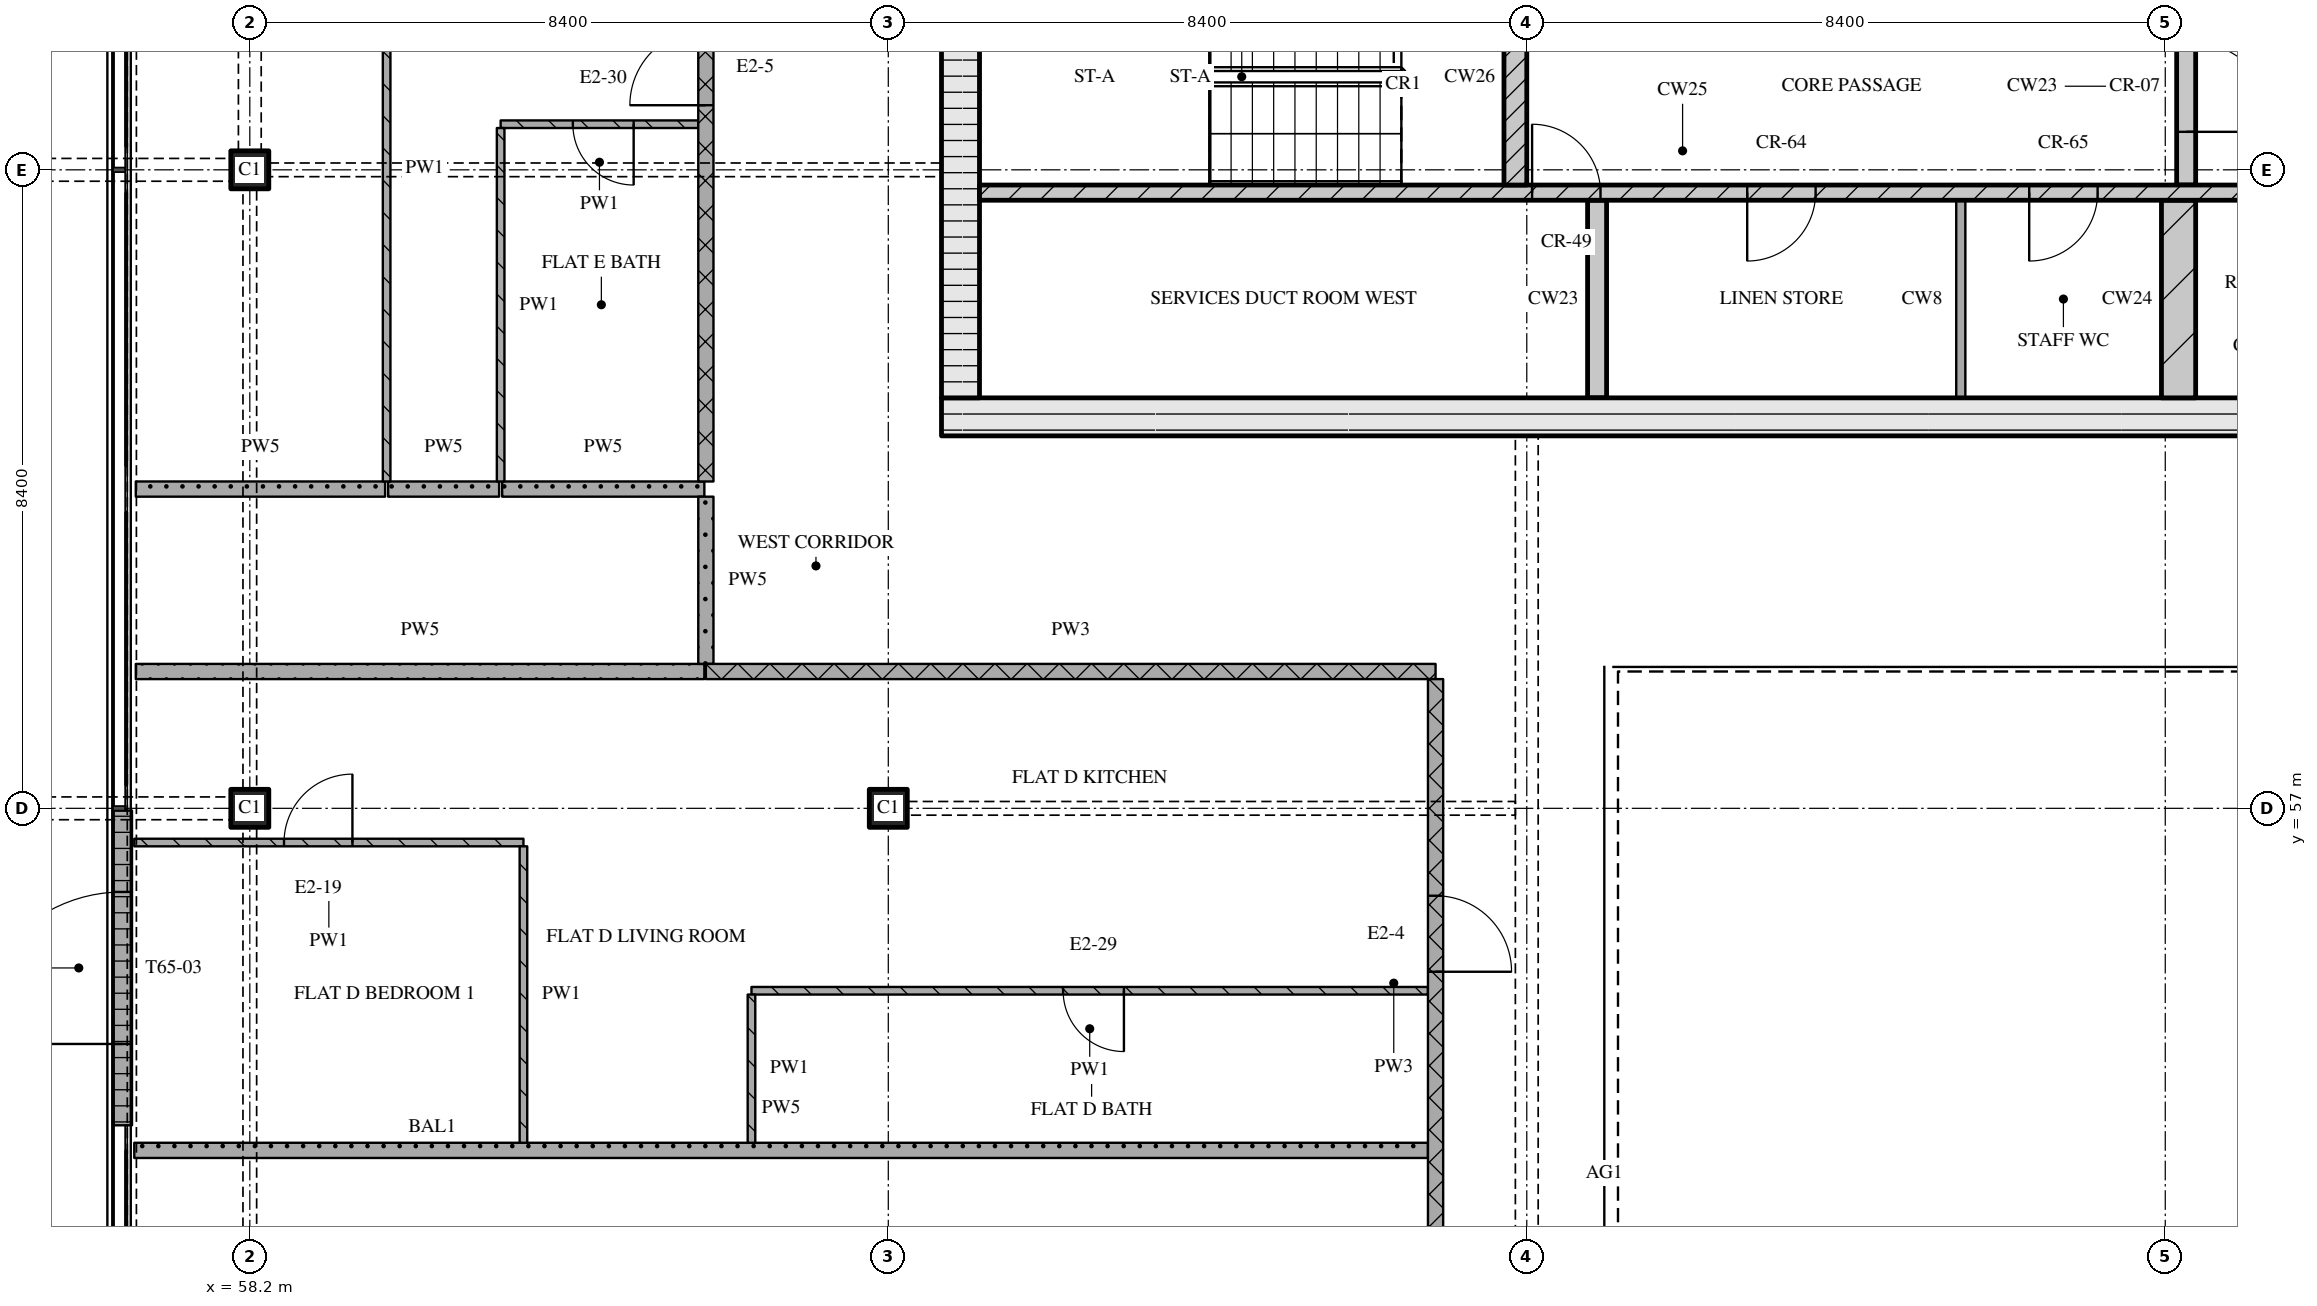
"""IFC4 building model, lengths in metres.
Left out: names, types, materials, properties, quantities, classifications, styles, units other than length and angle.
Written with IfcOpenShell. Run it as: python <this file> out.ifc"""

import sys

from ifc_helpers import new_model, si_unit, direction, frame, frame_2d, origin, origin_2d, place, context, subcontext, project, spatial, rectangle, extrude, element, fill, save


model = new_model("IFC4")
c1 = context("Model", 3, precision=1e-05, world=origin(), true_north=direction((0.0, 1.0)))
c2 = subcontext(c1, "Body", "Model", "MODEL_VIEW")
j1 = project(units=[si_unit("LENGTHUNIT", "METRE"), si_unit("PLANEANGLEUNIT", "RADIAN")], contexts=[c1])
p1 = place(None, origin())
s1 = spatial("IfcSite", under=j1, at=p1, CompositionType="ELEMENT")
p2 = place(p1, origin())
s2 = spatial("IfcBuilding", under=s1, at=p2, CompositionType="ELEMENT")
p3 = place(p2, frame((0.0, 0.0, 270.75)))
s3 = spatial("IfcBuildingStorey", under=s2, at=p3, CompositionType="ELEMENT", Elevation=270.75)
for number, where, z_axis, x_axis in (
    (1, (58.2, 57.0, 0.0), (0.0, 0.0, 1.0), (1.0, 0.0, 0.0)),
    (2, (58.2, 65.4, 0.0), (0.0, 0.0, 1.0), (1.0, 0.0, 0.0)),
    (3, (66.6, 57.0, 0.0), (0.0, 0.0, 1.0), (1.0, 0.0, 0.0)),
):
    element("IfcColumn", number, at=place(p3, frame(where, z_axis=z_axis, x_axis=x_axis)), inside=s3, PredefinedType="COLUMN", context=c2, shape_type="SweptSolid", body=[
        extrude(rectangle(XDim=0.5, YDim=0.5, at=origin_2d()), origin(), (0.0, 0.0, 1.0), 3.6),
    ])
p4 = place(p3, frame((56.525, 52.83, 0.0), z_axis=(0.0, 0.0, 1.0), x_axis=(0.0, 1.0, 0.0)))
e4 = element("IfcWall", 4, at=p4, inside=s3, PredefinedType="SOLIDWALL", context=c2, shape_type="SweptSolid", body=[
    extrude(rectangle(XDim=4.14, YDim=0.25, at=frame_2d((2.07, 0.0))), origin(), (0.0, 0.0, 1.0), 3.32),
])
p5 = place(p4, frame((1.07, 0.0, 0.0)))
e5 = element("IfcOpeningElement", 5, at=p5, cuts=e4, PredefinedType="OPENING", context=c2, shape_type="SweptSolid", body=[
    extrude(rectangle(XDim=2.0, YDim=2.4, at=frame_2d((1.0, 1.2))), frame((0.0, 0.135, 0.0), z_axis=(0.0, -1.0, 0.0), x_axis=(1.0, 0.0, 0.0)), (0.0, 0.0, 1.0), 0.27),
])
p6 = place(p3, frame((67.3, 62.15, 0.0), z_axis=(0.0, 0.0, 1.0), x_axis=(1.0, 0.0, 0.0)))
e6 = element("IfcWall", 6, at=p6, inside=s3, PredefinedType="SOLIDWALL", context=c2, shape_type="SweptSolid", body=[
    extrude(rectangle(XDim=40.6, YDim=0.5, at=frame_2d((20.3, 0.0))), origin(), (0.0, 0.0, 1.0), 3.32),
])
p7 = place(p6, frame((20.65, 0.0, 0.0)))
e7 = element("IfcOpeningElement", 7, at=p7, cuts=e6, PredefinedType="OPENING", context=c2, shape_type="SweptSolid", body=[
    extrude(rectangle(XDim=1.8, YDim=2.1, at=frame_2d((0.9, 1.05))), frame((0.0, 0.26, 0.0), z_axis=(0.0, -1.0, 0.0), x_axis=(1.0, 0.0, 0.0)), (0.0, 0.0, 1.0), 0.52),
])
p8 = place(p3, frame((67.55, 62.4, 0.0), z_axis=(0.0, 0.0, 1.0), x_axis=(0.0, 1.0, 0.0)))
e8 = element("IfcWall", 8, at=p8, inside=s3, PredefinedType="SOLIDWALL", context=c2, shape_type="SweptSolid", body=[
    extrude(rectangle(XDim=12.0, YDim=0.5, at=frame_2d((6.0, 0.0))), origin(), (0.0, 0.0, 1.0), 3.32),
])
p9 = place(p8, frame((6.45, 0.0, 0.0)))
e9 = element("IfcOpeningElement", 9, at=p9, cuts=e8, PredefinedType="OPENING", context=c2, shape_type="SweptSolid", body=[
    extrude(rectangle(XDim=1.2, YDim=2.1, at=frame_2d((0.6, 1.05))), frame((0.0, 0.26, 0.0), z_axis=(0.0, -1.0, 0.0), x_axis=(1.0, 0.0, 0.0)), (0.0, 0.0, 1.0), 0.52),
])
p10 = place(p3, frame((75.925, 62.4, 0.0), z_axis=(0.0, 0.0, 1.0), x_axis=(0.0, 1.0, 0.0)))
e10 = element("IfcWall", 10, at=p10, inside=s3, PredefinedType="SOLIDWALL", context=c2, shape_type="SweptSolid", body=[
    extrude(rectangle(XDim=2.6, YDim=0.25, at=frame_2d((1.3, 0.0))), origin(), (0.0, 0.0, 1.0), 3.32),
])
p11 = place(p3, frame((80.71, 62.4, 0.0), z_axis=(0.0, 0.0, 1.0), x_axis=(0.0, 1.0, 0.0)))
e11 = element("IfcWall", 11, at=p11, inside=s3, PredefinedType="PARTITIONING", context=c2, shape_type="SweptSolid", body=[
    extrude(rectangle(XDim=2.6, YDim=0.12, at=frame_2d((1.3, 0.0))), origin(), (0.0, 0.0, 1.0), 3.32),
])
p12 = place(p3, frame((83.575, 62.4, 0.0), z_axis=(0.0, 0.0, 1.0), x_axis=(0.0, 1.0, 0.0)))
e12 = element("IfcWall", 12, at=p12, inside=s3, PredefinedType="SOLIDWALL", context=c2, shape_type="SweptSolid", body=[
    extrude(rectangle(XDim=2.6, YDim=0.45, at=frame_2d((1.3, 0.0))), origin(), (0.0, 0.0, 1.0), 3.32),
])
p13 = place(p3, frame((67.8, 65.1, 0.0), z_axis=(0.0, 0.0, 1.0), x_axis=(1.0, 0.0, 0.0)))
e13 = element("IfcWall", 13, at=p13, inside=s3, PredefinedType="SOLIDWALL", context=c2, shape_type="SweptSolid", body=[
    extrude(rectangle(XDim=18.5, YDim=0.2, at=frame_2d((9.25, 0.0))), origin(), (0.0, 0.0, 1.0), 3.32),
])
p14 = place(p13, frame((7.27, 0.0, 0.0)))
e14 = element("IfcOpeningElement", 14, at=p14, cuts=e13, PredefinedType="OPENING", context=c2, shape_type="SweptSolid", body=[
    extrude(rectangle(XDim=0.9, YDim=2.1, at=frame_2d((0.45, 1.05))), frame((0.0, 0.11, 0.0), z_axis=(0.0, -1.0, 0.0), x_axis=(1.0, 0.0, 0.0)), (0.0, 0.0, 1.0), 0.22),
])
p15 = place(p13, frame((10.1, 0.0, 0.0)))
e15 = element("IfcOpeningElement", 15, at=p15, cuts=e13, PredefinedType="OPENING", context=c2, shape_type="SweptSolid", body=[
    extrude(rectangle(XDim=0.9, YDim=2.1, at=frame_2d((0.45, 1.05))), frame((0.0, 0.11, 0.0), z_axis=(0.0, -1.0, 0.0), x_axis=(1.0, 0.0, 0.0)), (0.0, 0.0, 1.0), 0.22),
])
p16 = place(p13, frame((13.81, 0.0, 0.0)))
e16 = element("IfcOpeningElement", 16, at=p16, cuts=e13, PredefinedType="OPENING", context=c2, shape_type="SweptSolid", body=[
    extrude(rectangle(XDim=0.9, YDim=2.1, at=frame_2d((0.45, 1.05))), frame((0.0, 0.11, 0.0), z_axis=(0.0, -1.0, 0.0), x_axis=(1.0, 0.0, 0.0)), (0.0, 0.0, 1.0), 0.22),
])
p17 = place(p13, frame((16.7, 0.0, 0.0)))
e17 = element("IfcOpeningElement", 17, at=p17, cuts=e13, PredefinedType="OPENING", context=c2, shape_type="SweptSolid", body=[
    extrude(rectangle(XDim=0.9, YDim=2.1, at=frame_2d((0.45, 1.05))), frame((0.0, 0.11, 0.0), z_axis=(0.0, -1.0, 0.0), x_axis=(1.0, 0.0, 0.0)), (0.0, 0.0, 1.0), 0.22),
])
p18 = place(p3, frame((74.85, 65.2, 0.0), z_axis=(0.0, 0.0, 1.0), x_axis=(0.0, 1.0, 0.0)))
e18 = element("IfcWall", 18, at=p18, inside=s3, PredefinedType="SOLIDWALL", context=c2, shape_type="SweptSolid", body=[
    extrude(rectangle(XDim=2.85, YDim=0.3, at=frame_2d((1.425, 0.0))), origin(), (0.0, 0.0, 1.0), 3.32),
])
p19 = place(p3, frame((83.675, 65.2, 0.0), z_axis=(0.0, 0.0, 1.0), x_axis=(0.0, 1.0, 0.0)))
e19 = element("IfcWall", 19, at=p19, inside=s3, PredefinedType="SOLIDWALL", context=c2, shape_type="SweptSolid", body=[
    extrude(rectangle(XDim=2.6, YDim=0.25, at=frame_2d((1.3, 0.0))), origin(), (0.0, 0.0, 1.0), 3.32),
])
p20 = place(p19, frame((0.7, 0.0, 0.0)))
e20 = element("IfcOpeningElement", 20, at=p20, cuts=e19, PredefinedType="OPENING", context=c2, shape_type="SweptSolid", body=[
    extrude(rectangle(XDim=1.2, YDim=2.1, at=frame_2d((0.6, 1.05))), frame((0.0, 0.135, 0.0), z_axis=(0.0, -1.0, 0.0), x_axis=(1.0, 0.0, 0.0)), (0.0, 0.0, 1.0), 0.27),
])
p21 = place(p3, frame((56.68, 52.5, 0.0), z_axis=(0.0, 0.0, 1.0), x_axis=(1.0, 0.0, 0.0)))
e21 = element("IfcWall", 21, at=p21, inside=s3, PredefinedType="PARTITIONING", context=c2, shape_type="SweptSolid", body=[
    extrude(rectangle(XDim=17.02, YDim=0.2, at=frame_2d((8.51, 0.0))), origin(), (0.0, 0.0, 1.0), 3.32),
])
p22 = place(p3, frame((73.7, 54.6, 0.0), z_axis=(0.0, 0.0, 1.0), x_axis=(-1.0, 0.0, 0.0)))
e22 = element("IfcWall", 22, at=p22, inside=s3, PredefinedType="PARTITIONING", context=c2, shape_type="SweptSolid", body=[
    extrude(rectangle(XDim=8.9, YDim=0.1, at=frame_2d((4.45, 0.0))), origin(), (0.0, 0.0, 1.0), 3.32),
])
p23 = place(p22, frame((4.0, 0.0, 0.0)))
e23 = element("IfcOpeningElement", 23, at=p23, cuts=e22, PredefinedType="OPENING", context=c2, shape_type="SweptSolid", body=[
    extrude(rectangle(XDim=0.8, YDim=2.1, at=frame_2d((0.4, 1.05))), frame((0.0, 0.06, 0.0), z_axis=(0.0, -1.0, 0.0), x_axis=(1.0, 0.0, 0.0)), (0.0, 0.0, 1.0), 0.12),
])
p24 = place(p3, frame((61.8, 56.55, 0.0), z_axis=(0.0, 0.0, 1.0), x_axis=(-1.0, 0.0, 0.0)))
e24 = element("IfcWall", 24, at=p24, inside=s3, PredefinedType="PARTITIONING", context=c2, shape_type="SweptSolid", body=[
    extrude(rectangle(XDim=5.12, YDim=0.1, at=frame_2d((2.56, 0.0))), origin(), (0.0, 0.0, 1.0), 3.32),
])
p25 = place(p24, frame((2.25, 0.0, 0.0)))
e25 = element("IfcOpeningElement", 25, at=p25, cuts=e24, PredefinedType="OPENING", context=c2, shape_type="SweptSolid", body=[
    extrude(rectangle(XDim=0.9, YDim=2.1, at=frame_2d((0.45, 1.05))), frame((0.0, 0.06, 0.0), z_axis=(0.0, -1.0, 0.0), x_axis=(1.0, 0.0, 0.0)), (0.0, 0.0, 1.0), 0.12),
])
p26 = place(p3, frame((64.2, 58.8, 0.0), z_axis=(0.0, 0.0, 1.0), x_axis=(1.0, 0.0, 0.0)))
e26 = element("IfcWall", 26, at=p26, inside=s3, PredefinedType="PARTITIONING", context=c2, shape_type="SweptSolid", body=[
    extrude(rectangle(XDim=9.6, YDim=0.2, at=frame_2d((4.8, 0.0))), origin(), (0.0, 0.0, 1.0), 3.32),
])
p27 = place(p3, frame((56.7, 58.8, 0.0), z_axis=(0.0, 0.0, 1.0), x_axis=(1.0, 0.0, 0.0)))
e27 = element("IfcWall", 27, at=p27, inside=s3, PredefinedType="PARTITIONING", context=c2, shape_type="SweptSolid", body=[
    extrude(rectangle(XDim=7.48, YDim=0.2, at=frame_2d((3.74, 0.0))), origin(), (0.0, 0.0, 1.0), 3.32),
])
p28 = place(p3, frame((56.7, 61.2, 0.0), z_axis=(0.0, 0.0, 1.0), x_axis=(1.0, 0.0, 0.0)))
e28 = element("IfcWall", 28, at=p28, inside=s3, PredefinedType="PARTITIONING", context=c2, shape_type="SweptSolid", body=[
    extrude(rectangle(XDim=3.28, YDim=0.2, at=frame_2d((1.64, 0.0))), origin(), (0.0, 0.0, 1.0), 3.32),
])
p29 = place(p3, frame((60.02, 61.2, 0.0), z_axis=(0.0, 0.0, 1.0), x_axis=(1.0, 0.0, 0.0)))
e29 = element("IfcWall", 29, at=p29, inside=s3, PredefinedType="PARTITIONING", context=c2, shape_type="SweptSolid", body=[
    extrude(rectangle(XDim=1.46, YDim=0.2, at=frame_2d((0.73, 0.0))), origin(), (0.0, 0.0, 1.0), 3.32),
])
p30 = place(p3, frame((61.52, 61.2, 0.0), z_axis=(0.0, 0.0, 1.0), x_axis=(1.0, 0.0, 0.0)))
e30 = element("IfcWall", 30, at=p30, inside=s3, PredefinedType="PARTITIONING", context=c2, shape_type="SweptSolid", body=[
    extrude(rectangle(XDim=2.66, YDim=0.2, at=frame_2d((1.33, 0.0))), origin(), (0.0, 0.0, 1.0), 3.32),
])
p31 = place(p3, frame((64.1, 66.0, 0.0), z_axis=(0.0, 0.0, 1.0), x_axis=(-1.0, 0.0, 0.0)))
e31 = element("IfcWall", 31, at=p31, inside=s3, PredefinedType="PARTITIONING", context=c2, shape_type="SweptSolid", body=[
    extrude(rectangle(XDim=2.6, YDim=0.1, at=frame_2d((1.3, 0.0))), origin(), (0.0, 0.0, 1.0), 3.32),
])
p32 = place(p31, frame((0.85, 0.0, 0.0)))
e32 = element("IfcOpeningElement", 32, at=p32, cuts=e31, PredefinedType="OPENING", context=c2, shape_type="SweptSolid", body=[
    extrude(rectangle(XDim=0.8, YDim=2.1, at=frame_2d((0.4, 1.05))), frame((0.0, 0.06, 0.0), z_axis=(0.0, -1.0, 0.0), x_axis=(1.0, 0.0, 0.0)), (0.0, 0.0, 1.0), 0.12),
])
p33 = place(p3, frame((60.0, 69.55, 0.0), z_axis=(0.0, 0.0, 1.0), x_axis=(0.0, -1.0, 0.0)))
e33 = element("IfcWall", 33, at=p33, inside=s3, PredefinedType="PARTITIONING", context=c2, shape_type="SweptSolid", body=[
    extrude(rectangle(XDim=8.25, YDim=0.1, at=frame_2d((4.125, 0.0))), origin(), (0.0, 0.0, 1.0), 3.32),
])
p34 = place(p3, frame((61.5, 65.95, 0.0), z_axis=(0.0, 0.0, 1.0), x_axis=(0.0, -1.0, 0.0)))
e34 = element("IfcWall", 34, at=p34, inside=s3, PredefinedType="PARTITIONING", context=c2, shape_type="SweptSolid", body=[
    extrude(rectangle(XDim=4.65, YDim=0.1, at=frame_2d((2.325, 0.0))), origin(), (0.0, 0.0, 1.0), 3.32),
])
p35 = place(p3, frame((61.8, 56.5, 0.0), z_axis=(0.0, 0.0, 1.0), x_axis=(0.0, -1.0, 0.0)))
e35 = element("IfcWall", 35, at=p35, inside=s3, PredefinedType="PARTITIONING", context=c2, shape_type="SweptSolid", body=[
    extrude(rectangle(XDim=3.9, YDim=0.1, at=frame_2d((1.95, 0.0))), origin(), (0.0, 0.0, 1.0), 3.32),
])
p36 = place(p3, frame((64.2, 61.3, 0.0), z_axis=(0.0, 0.0, 1.0), x_axis=(0.0, 1.0, 0.0)))
e36 = element("IfcWall", 36, at=p36, inside=s3, PredefinedType="PARTITIONING", context=c2, shape_type="SweptSolid", body=[
    extrude(rectangle(XDim=14.02, YDim=0.2, at=frame_2d((7.01, 0.0))), origin(), (0.0, 0.0, 1.0), 3.32),
])
p37 = place(p36, frame((4.95, 0.0, 0.0)))
e37 = element("IfcOpeningElement", 37, at=p37, cuts=e36, PredefinedType="OPENING", context=c2, shape_type="SweptSolid", body=[
    extrude(rectangle(XDim=1.0, YDim=2.1, at=frame_2d((0.5, 1.05))), frame((0.0, 0.11, 0.0), z_axis=(0.0, -1.0, 0.0), x_axis=(1.0, 0.0, 0.0)), (0.0, 0.0, 1.0), 0.22),
])
p38 = place(p3, frame((64.2, 61.1, 0.0), z_axis=(0.0, 0.0, 1.0), x_axis=(0.0, -1.0, 0.0)))
e38 = element("IfcWall", 38, at=p38, inside=s3, PredefinedType="PARTITIONING", context=c2, shape_type="SweptSolid", body=[
    extrude(rectangle(XDim=2.2, YDim=0.2, at=frame_2d((1.1, 0.0))), origin(), (0.0, 0.0, 1.0), 3.32),
])
p39 = place(p3, frame((64.8, 54.55, 0.0), z_axis=(0.0, 0.0, 1.0), x_axis=(0.0, -1.0, 0.0)))
e39 = element("IfcWall", 39, at=p39, inside=s3, PredefinedType="PARTITIONING", context=c2, shape_type="SweptSolid", body=[
    extrude(rectangle(XDim=1.95, YDim=0.1, at=frame_2d((0.975, 0.0))), origin(), (0.0, 0.0, 1.0), 3.32),
])
p40 = place(p3, frame((73.8, 50.7, 0.0), z_axis=(0.0, 0.0, 1.0), x_axis=(0.0, 1.0, 0.0)))
e40 = element("IfcWall", 40, at=p40, inside=s3, PredefinedType="PARTITIONING", context=c2, shape_type="SweptSolid", body=[
    extrude(rectangle(XDim=8.0, YDim=0.2, at=frame_2d((4.0, 0.0))), origin(), (0.0, 0.0, 1.0), 3.32),
])
p41 = place(p40, frame((4.15, 0.0, 0.0)))
e41 = element("IfcOpeningElement", 41, at=p41, cuts=e40, PredefinedType="OPENING", context=c2, shape_type="SweptSolid", body=[
    extrude(rectangle(XDim=1.0, YDim=2.1, at=frame_2d((0.5, 1.05))), frame((0.0, 0.11, 0.0), z_axis=(0.0, -1.0, 0.0), x_axis=(1.0, 0.0, 0.0)), (0.0, 0.0, 1.0), 0.22),
])
p42 = place(p5, origin())
e42 = element("IfcDoor", 42, at=p42, inside=s3, OperationType="DOUBLE_DOOR_SINGLE_SWING", PredefinedType="DOOR", context=c2, shape_type="SweptSolid", body=[
    extrude(rectangle(XDim=2.0, YDim=2.4, at=frame_2d((1.0, 1.2))), frame((0.0, 0.025, 0.0), z_axis=(0.0, -1.0, 0.0), x_axis=(1.0, 0.0, 0.0)), (0.0, 0.0, 1.0), 0.05),
])
fill(e5, e42)
p43 = place(p14, origin())
e43 = element("IfcDoor", 43, at=p43, inside=s3, OperationType="SINGLE_SWING_LEFT", PredefinedType="DOOR", context=c2, shape_type="SweptSolid", body=[
    extrude(rectangle(XDim=0.9, YDim=2.1, at=frame_2d((0.45, 1.05))), frame((0.0, 0.025, 0.0), z_axis=(0.0, -1.0, 0.0), x_axis=(1.0, 0.0, 0.0)), (0.0, 0.0, 1.0), 0.05),
])
fill(e14, e43)
p44 = place(p15, origin())
e44 = element("IfcDoor", 44, at=p44, inside=s3, OperationType="SINGLE_SWING_RIGHT", PredefinedType="DOOR", context=c2, shape_type="SweptSolid", body=[
    extrude(rectangle(XDim=0.9, YDim=2.1, at=frame_2d((0.45, 1.05))), frame((0.0, 0.025, 0.0), z_axis=(0.0, -1.0, 0.0), x_axis=(1.0, 0.0, 0.0)), (0.0, 0.0, 1.0), 0.05),
])
fill(e15, e44)
p45 = place(p16, origin())
e45 = element("IfcDoor", 45, at=p45, inside=s3, OperationType="SINGLE_SWING_RIGHT", PredefinedType="DOOR", context=c2, shape_type="SweptSolid", body=[
    extrude(rectangle(XDim=0.9, YDim=2.1, at=frame_2d((0.45, 1.05))), frame((0.0, 0.025, 0.0), z_axis=(0.0, -1.0, 0.0), x_axis=(1.0, 0.0, 0.0)), (0.0, 0.0, 1.0), 0.05),
])
fill(e16, e45)
p46 = place(p20, origin())
e46 = element("IfcDoor", 46, at=p46, inside=s3, OperationType="SINGLE_SWING_RIGHT", PredefinedType="DOOR", context=c2, shape_type="SweptSolid", body=[
    extrude(rectangle(XDim=1.2, YDim=2.1, at=frame_2d((0.6, 1.05))), frame((0.0, 0.025, 0.0), z_axis=(0.0, -1.0, 0.0), x_axis=(1.0, 0.0, 0.0)), (0.0, 0.0, 1.0), 0.05),
])
fill(e20, e46)
p47 = place(p23, origin())
e47 = element("IfcDoor", 47, at=p47, inside=s3, OperationType="SINGLE_SWING_LEFT", PredefinedType="DOOR", context=c2, shape_type="SweptSolid", body=[
    extrude(rectangle(XDim=0.8, YDim=2.1, at=frame_2d((0.4, 1.05))), frame((0.0, 0.025, 0.0), z_axis=(0.0, -1.0, 0.0), x_axis=(1.0, 0.0, 0.0)), (0.0, 0.0, 1.0), 0.05),
])
fill(e23, e47)
p48 = place(p25, origin())
e48 = element("IfcDoor", 48, at=p48, inside=s3, OperationType="SINGLE_SWING_RIGHT", PredefinedType="DOOR", context=c2, shape_type="SweptSolid", body=[
    extrude(rectangle(XDim=0.9, YDim=2.1, at=frame_2d((0.45, 1.05))), frame((0.0, 0.025, 0.0), z_axis=(0.0, -1.0, 0.0), x_axis=(1.0, 0.0, 0.0)), (0.0, 0.0, 1.0), 0.05),
])
fill(e25, e48)
p49 = place(p32, origin())
e49 = element("IfcDoor", 49, at=p49, inside=s3, OperationType="SINGLE_SWING_LEFT", PredefinedType="DOOR", context=c2, shape_type="SweptSolid", body=[
    extrude(rectangle(XDim=0.8, YDim=2.1, at=frame_2d((0.4, 1.05))), frame((0.0, 0.025, 0.0), z_axis=(0.0, -1.0, 0.0), x_axis=(1.0, 0.0, 0.0)), (0.0, 0.0, 1.0), 0.05),
])
fill(e32, e49)
p50 = place(p37, origin())
e50 = element("IfcDoor", 50, at=p50, inside=s3, OperationType="SINGLE_SWING_LEFT", PredefinedType="DOOR", context=c2, shape_type="SweptSolid", body=[
    extrude(rectangle(XDim=1.0, YDim=2.1, at=frame_2d((0.5, 1.05))), frame((0.0, 0.025, 0.0), z_axis=(0.0, -1.0, 0.0), x_axis=(1.0, 0.0, 0.0)), (0.0, 0.0, 1.0), 0.05),
])
fill(e37, e50)
p51 = place(p41, origin())
e51 = element("IfcDoor", 51, at=p51, inside=s3, OperationType="SINGLE_SWING_RIGHT", PredefinedType="DOOR", context=c2, shape_type="SweptSolid", body=[
    extrude(rectangle(XDim=1.0, YDim=2.1, at=frame_2d((0.5, 1.05))), frame((0.0, 0.025, 0.0), z_axis=(0.0, -1.0, 0.0), x_axis=(1.0, 0.0, 0.0)), (0.0, 0.0, 1.0), 0.05),
])
fill(e41, e51)
save(model, sys.argv[1])
